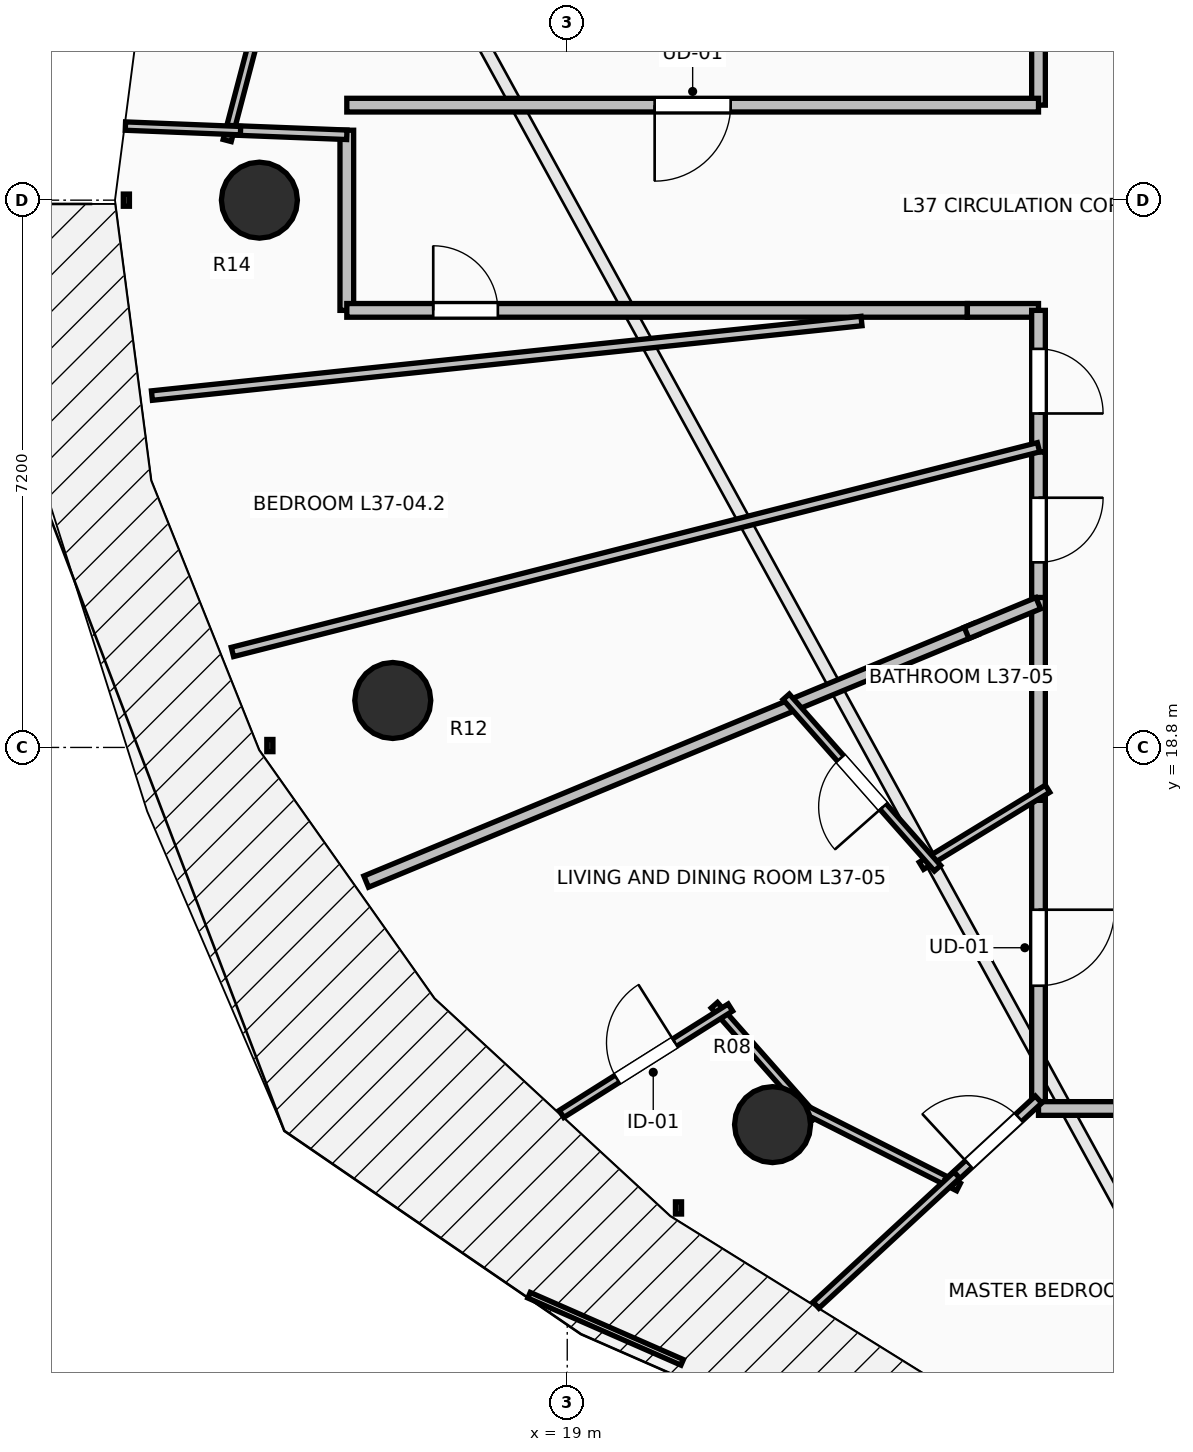
"""IFC4 building model, lengths in metres.
Left out: names, types, materials, properties, quantities, classifications, styles, units other than length and angle.
Written with IfcOpenShell. Run it as: python <this file> out.ifc"""

import sys

from ifc_helpers import new_model, si_unit, direction, frame, frame_2d, origin, origin_2d, place, context, subcontext, project, spatial, rectangle, circle, extrude, element, fill, save


model = new_model("IFC4")
c1 = context("Model", 3, precision=1e-05, world=origin(), true_north=direction((0.0, 1.0)))
c2 = subcontext(c1, "Body", "Model", "MODEL_VIEW")
j1 = project(units=[si_unit("LENGTHUNIT", "METRE"), si_unit("PLANEANGLEUNIT", "RADIAN")], contexts=[c1])
p1 = place(None, origin())
s1 = spatial("IfcSite", under=j1, at=p1, CompositionType="ELEMENT")
p2 = place(p1, origin())
s2 = spatial("IfcBuilding", under=s1, at=p2, CompositionType="ELEMENT")
p3 = place(p2, frame((0.0, 0.0, 139.6)))
s3 = spatial("IfcBuildingStorey", under=s2, at=p3, CompositionType="ELEMENT", Elevation=139.6)
for number, where, z_axis, x_axis in (
    (1, (14.95, 26.0, 0.0), (0.0, 0.0, 1.0), (-1.0, 0.0, 0.0)),
    (2, (16.705, 19.418, 0.0), (0.0, 0.0, 1.0), (-0.924, -0.383, 0.0)),
    (3, (21.701, 13.838, 0.0), (0.0, 0.0, 1.0), (-0.707, -0.707, 0.0)),
):
    element("IfcColumn", number, at=place(p3, frame(where, z_axis=z_axis, x_axis=x_axis)), inside=s3, PredefinedType="COLUMN", context=c2, shape_type="SweptSolid", body=[
        extrude(circle(Radius=0.5, at=origin_2d()), origin(), (0.0, 0.0, 1.0), 3.5),
    ])
p4 = place(p3, frame((25.2, 29.156, 0.0), z_axis=(0.0, 0.0, 1.0), x_axis=(0.0, -1.0, 0.0)))
e4 = element("IfcWall", 4, at=p4, inside=s3, PredefinedType="PARTITIONING", context=c2, shape_type="SweptSolid", body=[
    extrude(rectangle(XDim=1.906, YDim=0.18, at=frame_2d((0.953, 0.0))), origin(), (0.0, 0.0, 1.0), 2.432),
])
p5 = place(p3, frame((25.2, 27.25, 0.0), z_axis=(0.0, 0.0, 1.0), x_axis=(-1.0, 0.0, 0.0)))
e5 = element("IfcWall", 5, at=p5, inside=s3, PredefinedType="PARTITIONING", context=c2, shape_type="SweptSolid", body=[
    extrude(rectangle(XDim=9.1, YDim=0.18, at=frame_2d((4.55, 0.0))), origin(), (0.0, 0.0, 1.0), 2.432),
])
p6 = place(p5, frame((4.05, 0.0, 0.0)))
e6 = element("IfcOpeningElement", 6, at=p6, cuts=e5, PredefinedType="OPENING", context=c2, shape_type="SweptSolid", body=[
    extrude(rectangle(XDim=1.0, YDim=2.15, at=frame_2d((0.5, 1.075))), frame((0.0, 0.105, 0.0), z_axis=(0.0, -1.0, 0.0), x_axis=(1.0, 0.0, 0.0)), (0.0, 0.0, 1.0), 0.21),
])
p7 = place(p3, frame((16.1, 26.92, 0.0), z_axis=(0.0, 0.0, 1.0), x_axis=(0.0, -1.0, 0.0)))
e7 = element("IfcWall", 7, at=p7, inside=s3, PredefinedType="PARTITIONING", context=c2, shape_type="SweptSolid", body=[
    extrude(rectangle(XDim=2.37, YDim=0.18, at=frame_2d((1.185, 0.0))), origin(), (0.0, 0.0, 1.0), 2.432),
])
p8 = place(p3, frame((16.1, 24.55, 0.0), z_axis=(0.0, 0.0, 1.0), x_axis=(1.0, 0.0, 0.0)))
e8 = element("IfcWall", 8, at=p8, inside=s3, PredefinedType="PARTITIONING", context=c2, shape_type="SweptSolid", body=[
    extrude(rectangle(XDim=8.164, YDim=0.18, at=frame_2d((4.082, 0.0))), origin(), (0.0, 0.0, 1.0), 2.922),
])
p9 = place(p8, frame((1.137, 0.0, 0.0)))
e9 = element("IfcOpeningElement", 9, at=p9, cuts=e8, PredefinedType="OPENING", context=c2, shape_type="SweptSolid", body=[
    extrude(rectangle(XDim=0.85, YDim=2.1, at=frame_2d((0.425, 1.05))), frame((0.0, 0.105, 0.0), z_axis=(0.0, -1.0, 0.0), x_axis=(1.0, 0.0, 0.0)), (0.0, 0.0, 1.0), 0.21),
])
p10 = place(p3, frame((24.264, 24.55, 0.0), z_axis=(0.0, 0.0, 1.0), x_axis=(1.0, 0.0, 0.0)))
e10 = element("IfcWall", 10, at=p10, inside=s3, PredefinedType="PARTITIONING", context=c2, shape_type="SweptSolid", body=[
    extrude(rectangle(XDim=0.936, YDim=0.18, at=frame_2d((0.468, 0.0))), origin(), (0.0, 0.0, 1.0), 3.24),
])
p11 = place(p3, frame((25.2, 24.55, 0.0), z_axis=(0.0, 0.0, 1.0), x_axis=(0.0, -1.0, 0.0)))
e11 = element("IfcWall", 11, at=p11, inside=s3, PredefinedType="PARTITIONING", context=c2, shape_type="SweptSolid", body=[
    extrude(rectangle(XDim=1.863, YDim=0.18, at=frame_2d((0.932, 0.0))), origin(), (0.0, 0.0, 1.0), 3.24),
])
p12 = place(p11, frame((0.507, 0.0, 0.0)))
e12 = element("IfcOpeningElement", 12, at=p12, cuts=e11, PredefinedType="OPENING", context=c2, shape_type="SweptSolid", body=[
    extrude(rectangle(XDim=0.85, YDim=2.1, at=frame_2d((0.425, 1.05))), frame((0.0, 0.105, 0.0), z_axis=(0.0, -1.0, 0.0), x_axis=(1.0, 0.0, 0.0)), (0.0, 0.0, 1.0), 0.21),
])
p13 = place(p3, frame((25.2, 22.687, 0.0), z_axis=(0.0, 0.0, 1.0), x_axis=(0.0, -1.0, 0.0)))
e13 = element("IfcWall", 13, at=p13, inside=s3, PredefinedType="PARTITIONING", context=c2, shape_type="SweptSolid", body=[
    extrude(rectangle(XDim=2.054, YDim=0.18, at=frame_2d((1.027, 0.0))), origin(), (0.0, 0.0, 1.0), 3.24),
])
p14 = place(p13, frame((0.602, 0.0, 0.0)))
e14 = element("IfcOpeningElement", 14, at=p14, cuts=e13, PredefinedType="OPENING", context=c2, shape_type="SweptSolid", body=[
    extrude(rectangle(XDim=0.85, YDim=2.1, at=frame_2d((0.425, 1.05))), frame((0.0, 0.105, 0.0), z_axis=(0.0, -1.0, 0.0), x_axis=(1.0, 0.0, 0.0)), (0.0, 0.0, 1.0), 0.21),
])
p15 = place(p3, frame((25.2, 18.244, 0.0), z_axis=(0.0, 0.0, 1.0), x_axis=(0.0, -1.0, 0.0)))
e15 = element("IfcWall", 15, at=p15, inside=s3, PredefinedType="PARTITIONING", context=c2, shape_type="SweptSolid", body=[
    extrude(rectangle(XDim=4.158, YDim=0.18, at=frame_2d((2.079, 0.0))), origin(), (0.0, 0.0, 1.0), 2.432),
])
p16 = place(p15, frame((1.579, 0.0, 0.0)))
e16 = element("IfcOpeningElement", 16, at=p16, cuts=e15, PredefinedType="OPENING", context=c2, shape_type="SweptSolid", body=[
    extrude(rectangle(XDim=1.0, YDim=2.15, at=frame_2d((0.5, 1.075))), frame((0.0, 0.105, 0.0), z_axis=(0.0, -1.0, 0.0), x_axis=(1.0, 0.0, 0.0)), (0.0, 0.0, 1.0), 0.21),
])
p17 = place(p3, frame((25.2, 20.773, 0.0), z_axis=(0.0, 0.0, 1.0), x_axis=(0.0, -1.0, 0.0)))
e17 = element("IfcWall", 17, at=p17, inside=s3, PredefinedType="PARTITIONING", context=c2, shape_type="SweptSolid", body=[
    extrude(rectangle(XDim=2.669, YDim=0.18, at=frame_2d((1.334, 0.0))), origin(), (0.0, 0.0, 1.0), 3.24),
])
p18 = place(p3, frame((25.2, 14.05, 0.0), z_axis=(0.0, 0.0, 1.0), x_axis=(1.0, 0.0, 0.0)))
e18 = element("IfcWall", 18, at=p18, inside=s3, PredefinedType="PARTITIONING", context=c2, shape_type="SweptSolid", body=[
    extrude(rectangle(XDim=4.531, YDim=0.18, at=frame_2d((2.266, 0.0))), origin(), (0.0, 0.0, 1.0), 2.432),
])
p19 = place(p3, frame((15.689, 31.204, 0.0), z_axis=(0.0, 0.0, 1.0), x_axis=(-0.254346037576, -0.967113278354, 0.0)))
e19 = element("IfcWall", 19, at=p19, inside=s3, PredefinedType="PARTITIONING", context=c2, shape_type="SweptSolid", body=[
    extrude(rectangle(XDim=4.57, YDim=0.11, at=frame_2d((2.285, 0.0))), origin(), (0.0, 0.0, 1.0), 3.24),
])
p20 = place(p19, frame((1.835, 0.0, 0.0)))
e20 = element("IfcOpeningElement", 20, at=p20, cuts=e19, PredefinedType="OPENING", context=c2, shape_type="SweptSolid", body=[
    extrude(rectangle(XDim=0.9, YDim=2.1, at=frame_2d((0.45, 1.05))), frame((0.0, 0.07, 0.0), z_axis=(0.0, -1.0, 0.0), x_axis=(1.0, 0.0, 0.0)), (0.0, 0.0, 1.0), 0.14),
])
p21 = place(p3, frame((14.562, 26.92, 0.0), z_axis=(0.0, 0.0, 1.0), x_axis=(0.999244683777, -0.03885951548, 0.0)))
e21 = element("IfcWall", 21, at=p21, inside=s3, PredefinedType="PARTITIONING", context=c2, shape_type="SweptSolid", body=[
    extrude(rectangle(XDim=1.539, YDim=0.125, at=frame_2d((0.77, 0.0))), origin(), (0.0, 0.0, 1.0), 2.728),
])
p22 = place(p3, frame((13.187, 26.975, 0.0), z_axis=(0.0, 0.0, 1.0), x_axis=(0.999208657324, -0.039775106907, 0.0)))
e22 = element("IfcWall", 22, at=p22, inside=s3, PredefinedType="PARTITIONING", context=c2, shape_type="SweptSolid", body=[
    extrude(rectangle(XDim=1.516, YDim=0.11, at=frame_2d((0.758, 0.0))), origin(), (0.0, 0.0, 1.0), 3.24),
])
p23 = place(p3, frame((13.536, 23.429, 0.0), z_axis=(0.0, 0.0, 1.0), x_axis=(0.994524817277, 0.104500659427, 0.0)))
e23 = element("IfcWall", 23, at=p23, inside=s3, PredefinedType="PARTITIONING", context=c2, shape_type="SweptSolid", body=[
    extrude(rectangle(XDim=9.387, YDim=0.125, at=frame_2d((4.694, 0.0))), origin(), (0.0, 0.0, 1.0), 2.728),
])
p24 = place(p3, frame((14.595, 20.056, 0.0), z_axis=(0.0, 0.0, 1.0), x_axis=(0.969235416515, 0.246135546747, 0.0)))
e24 = element("IfcWall", 24, at=p24, inside=s3, PredefinedType="PARTITIONING", context=c2, shape_type="SweptSolid", body=[
    extrude(rectangle(XDim=10.942, YDim=0.125, at=frame_2d((5.471, 0.0))), origin(), (0.0, 0.0, 1.0), 2.728),
])
p25 = place(p3, frame((16.355, 17.035, 0.0), z_axis=(0.0, 0.0, 1.0), x_axis=(0.923885339237, 0.382669413387, 0.0)))
e25 = element("IfcWall", 25, at=p25, inside=s3, PredefinedType="PARTITIONING", context=c2, shape_type="SweptSolid", body=[
    extrude(rectangle(XDim=8.689, YDim=0.16, at=frame_2d((4.345, 0.0))), origin(), (0.0, 0.0, 1.0), 2.432),
])
p26 = place(p3, frame((24.254, 20.306, 0.0), z_axis=(0.0, 0.0, 1.0), x_axis=(0.923789545328, 0.382900608439, 0.0)))
e26 = element("IfcWall", 26, at=p26, inside=s3, PredefinedType="PARTITIONING", context=c2, shape_type="SweptSolid", body=[
    extrude(rectangle(XDim=1.021, YDim=0.16, at=frame_2d((0.511, 0.0))), origin(), (0.0, 0.0, 1.0), 3.24),
])
p27 = place(p3, frame((25.32, 18.257, 0.0), z_axis=(0.0, 0.0, 1.0), x_axis=(-0.853368681548, -0.52130786811, 0.0)))
e27 = element("IfcWall", 27, at=p27, inside=s3, PredefinedType="PARTITIONING", context=c2, shape_type="SweptSolid", body=[
    extrude(rectangle(XDim=1.945, YDim=0.11, at=frame_2d((0.973, 0.0))), origin(), (0.0, 0.0, 1.0), 2.432),
])
p28 = place(p3, frame((23.872, 17.211, 0.0), z_axis=(0.0, 0.0, 1.0), x_axis=(-0.66196248337, 0.74953697081, 0.0)))
e28 = element("IfcWall", 28, at=p28, inside=s3, PredefinedType="PARTITIONING", context=c2, shape_type="SweptSolid", body=[
    extrude(rectangle(XDim=3.008, YDim=0.11, at=frame_2d((1.504, 0.0))), origin(), (0.0, 0.0, 1.0), 2.432),
])
p29 = place(p28, frame((1.079, 0.0, 0.0)))
e29 = element("IfcOpeningElement", 29, at=p29, cuts=e28, PredefinedType="OPENING", context=c2, shape_type="SweptSolid", body=[
    extrude(rectangle(XDim=0.85, YDim=2.1, at=frame_2d((0.425, 1.05))), frame((0.0, 0.07, 0.0), z_axis=(0.0, -1.0, 0.0), x_axis=(1.0, 0.0, 0.0)), (0.0, 0.0, 1.0), 0.14),
])
p30 = place(p3, frame((20.935, 15.409, 0.0), z_axis=(0.0, 0.0, 1.0), x_axis=(0.66216897397, -0.749354555542, 0.0)))
e30 = element("IfcWall", 30, at=p30, inside=s3, PredefinedType="PARTITIONING", context=c2, shape_type="SweptSolid", body=[
    extrude(rectangle(XDim=1.991, YDim=0.11, at=frame_2d((0.996, 0.0))), origin(), (0.0, 0.0, 1.0), 2.432),
])
p31 = place(p3, frame((22.036, 14.085, 0.0), z_axis=(0.0, 0.0, 1.0), x_axis=(0.892312874209, -0.451417472548, 0.0)))
e31 = element("IfcWall", 31, at=p31, inside=s3, PredefinedType="PARTITIONING", context=c2, shape_type="SweptSolid", body=[
    extrude(rectangle(XDim=2.367, YDim=0.11, at=frame_2d((1.183, 0.0))), origin(), (0.0, 0.0, 1.0), 2.432),
])
p32 = place(p3, frame((18.925, 13.979, 0.0), z_axis=(0.0, 0.0, 1.0), x_axis=(0.846034075758, 0.533128823697, 0.0)))
e32 = element("IfcWall", 32, at=p32, inside=s3, PredefinedType="PARTITIONING", context=c2, shape_type="SweptSolid", body=[
    extrude(rectangle(XDim=2.626, YDim=0.11, at=frame_2d((1.313, 0.0))), origin(), (0.0, 0.0, 1.0), 2.728),
])
p33 = place(p32, frame((0.863, 0.0, 0.0)))
e33 = element("IfcOpeningElement", 33, at=p33, cuts=e32, PredefinedType="OPENING", context=c2, shape_type="SweptSolid", body=[
    extrude(rectangle(XDim=0.9, YDim=2.1, at=frame_2d((0.45, 1.05))), frame((0.0, 0.07, 0.0), z_axis=(0.0, -1.0, 0.0), x_axis=(1.0, 0.0, 0.0)), (0.0, 0.0, 1.0), 0.14),
])
p34 = place(p3, frame((24.023, 13.08, 0.0), z_axis=(0.0, 0.0, 1.0), x_axis=(0.734359451791, 0.678760779336, 0.0)))
e34 = element("IfcWall", 34, at=p34, inside=s3, PredefinedType="PARTITIONING", context=c2, shape_type="SweptSolid", body=[
    extrude(rectangle(XDim=1.603, YDim=0.125, at=frame_2d((0.801, 0.0))), origin(), (0.0, 0.0, 1.0), 2.922),
])
p35 = place(p34, frame((0.351, 0.0, 0.0)))
e35 = element("IfcOpeningElement", 35, at=p35, cuts=e34, PredefinedType="OPENING", context=c2, shape_type="SweptSolid", body=[
    extrude(rectangle(XDim=0.9, YDim=2.1, at=frame_2d((0.45, 1.05))), frame((0.0, 0.077, 0.0), z_axis=(0.0, -1.0, 0.0), x_axis=(1.0, 0.0, 0.0)), (0.0, 0.0, 1.0), 0.155),
])
p36 = place(p3, frame((22.273, 11.463, 0.0), z_axis=(0.0, 0.0, 1.0), x_axis=(0.73438401738, 0.678734200565, 0.0)))
e36 = element("IfcWall", 36, at=p36, inside=s3, PredefinedType="PARTITIONING", context=c2, shape_type="SweptSolid", body=[
    extrude(rectangle(XDim=2.522, YDim=0.11, at=frame_2d((1.261, 0.0))), origin(), (0.0, 0.0, 1.0), 2.728),
])
p37 = place(p6, origin())
e37 = element("IfcDoor", 37, at=p37, inside=s3, OperationType="SINGLE_SWING_RIGHT", PredefinedType="DOOR", context=c2, shape_type="SweptSolid", body=[
    extrude(rectangle(XDim=1.0, YDim=2.15, at=frame_2d((0.5, 1.075))), frame((0.0, 0.025, 0.0), z_axis=(0.0, -1.0, 0.0), x_axis=(1.0, 0.0, 0.0)), (0.0, 0.0, 1.0), 0.05),
])
fill(e6, e37)
p38 = place(p16, origin())
e38 = element("IfcDoor", 38, at=p38, inside=s3, OperationType="SINGLE_SWING_LEFT", PredefinedType="DOOR", context=c2, shape_type="SweptSolid", body=[
    extrude(rectangle(XDim=1.0, YDim=2.15, at=frame_2d((0.5, 1.075))), frame((0.0, 0.025, 0.0), z_axis=(0.0, -1.0, 0.0), x_axis=(1.0, 0.0, 0.0)), (0.0, 0.0, 1.0), 0.05),
])
fill(e16, e38)
p39 = place(p29, origin())
e39 = element("IfcDoor", 39, at=p39, inside=s3, OperationType="SINGLE_SWING_LEFT", PredefinedType="DOOR", context=c2, shape_type="SweptSolid", body=[
    extrude(rectangle(XDim=0.85, YDim=2.1, at=frame_2d((0.425, 1.05))), frame((0.0, 0.025, 0.0), z_axis=(0.0, -1.0, 0.0), x_axis=(1.0, 0.0, 0.0)), (0.0, 0.0, 1.0), 0.05),
])
fill(e29, e39)
p40 = place(p33, origin())
e40 = element("IfcDoor", 40, at=p40, inside=s3, OperationType="SINGLE_SWING_RIGHT", PredefinedType="DOOR", context=c2, shape_type="SweptSolid", body=[
    extrude(rectangle(XDim=0.9, YDim=2.1, at=frame_2d((0.45, 1.05))), frame((0.0, 0.025, 0.0), z_axis=(0.0, -1.0, 0.0), x_axis=(1.0, 0.0, 0.0)), (0.0, 0.0, 1.0), 0.05),
])
fill(e33, e40)
p41 = place(p35, origin())
e41 = element("IfcDoor", 41, at=p41, inside=s3, OperationType="SINGLE_SWING_LEFT", PredefinedType="DOOR", context=c2, shape_type="SweptSolid", body=[
    extrude(rectangle(XDim=0.9, YDim=2.1, at=frame_2d((0.45, 1.05))), frame((0.0, 0.025, 0.0), z_axis=(0.0, -1.0, 0.0), x_axis=(1.0, 0.0, 0.0)), (0.0, 0.0, 1.0), 0.05),
])
fill(e35, e41)
p42 = place(p9, origin())
e42 = element("IfcDoor", 42, at=p42, inside=s3, OperationType="SINGLE_SWING_LEFT", PredefinedType="DOOR", context=c2, shape_type="SweptSolid", body=[
    extrude(rectangle(XDim=0.85, YDim=2.1, at=frame_2d((0.425, 1.05))), frame((0.0, 0.025, 0.0), z_axis=(0.0, -1.0, 0.0), x_axis=(1.0, 0.0, 0.0)), (0.0, 0.0, 1.0), 0.05),
])
fill(e9, e42)
p43 = place(p12, origin())
e43 = element("IfcDoor", 43, at=p43, inside=s3, OperationType="SINGLE_SWING_RIGHT", PredefinedType="DOOR", context=c2, shape_type="SweptSolid", body=[
    extrude(rectangle(XDim=0.85, YDim=2.1, at=frame_2d((0.425, 1.05))), frame((0.0, 0.025, 0.0), z_axis=(0.0, -1.0, 0.0), x_axis=(1.0, 0.0, 0.0)), (0.0, 0.0, 1.0), 0.05),
])
fill(e12, e43)
p44 = place(p14, origin())
e44 = element("IfcDoor", 44, at=p44, inside=s3, OperationType="SINGLE_SWING_LEFT", PredefinedType="DOOR", context=c2, shape_type="SweptSolid", body=[
    extrude(rectangle(XDim=0.85, YDim=2.1, at=frame_2d((0.425, 1.05))), frame((0.0, 0.025, 0.0), z_axis=(0.0, -1.0, 0.0), x_axis=(1.0, 0.0, 0.0)), (0.0, 0.0, 1.0), 0.05),
])
fill(e14, e44)
save(model, sys.argv[1])
